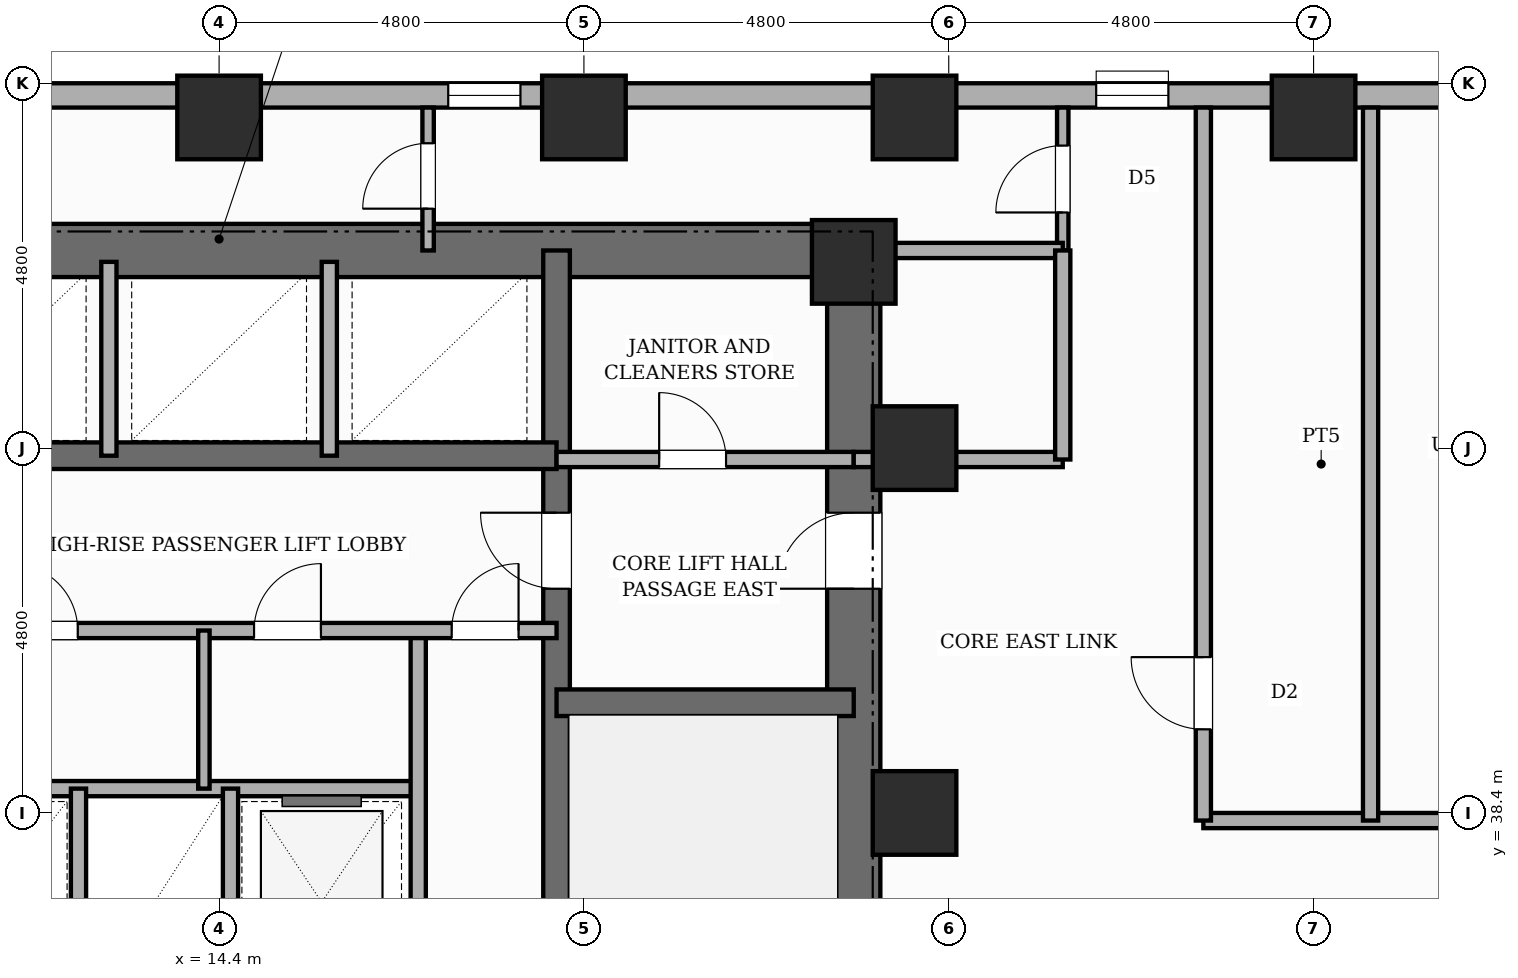
"""IFC4 building model, lengths in metres.
Left out: names, types, materials, properties, quantities, classifications, styles, units other than length and angle.
Written with IfcOpenShell. Run it as: python <this file> out.ifc"""

import sys

from ifc_helpers import new_model, si_unit, direction, frame, frame_2d, origin, origin_2d, place, context, subcontext, project, spatial, rectangle, extrude, element, fill, save


model = new_model("IFC4")
c1 = context("Model", 3, precision=1e-05, world=origin(), true_north=direction((0.0, 1.0)))
c2 = subcontext(c1, "Body", "Model", "MODEL_VIEW")
j1 = project(units=[si_unit("LENGTHUNIT", "METRE"), si_unit("PLANEANGLEUNIT", "RADIAN")], contexts=[c1])
p1 = place(None, origin())
s1 = spatial("IfcSite", under=j1, at=p1, CompositionType="ELEMENT")
p2 = place(p1, origin())
s2 = spatial("IfcBuilding", under=s1, at=p2, CompositionType="ELEMENT")
p3 = place(p2, frame((0.0, 0.0, 68.2)))
s3 = spatial("IfcBuildingStorey", under=s2, at=p3, CompositionType="ELEMENT", Elevation=68.2)
p4 = place(p3, frame((22.75, 30.55, 0.0), z_axis=(0.0, 0.0, 1.0), x_axis=(0.0, 1.0, 0.0)))
e1 = element("IfcWall", 1, at=p4, inside=s3, PredefinedType="SHEAR", context=c2, shape_type="SweptSolid", body=[
    extrude(rectangle(XDim=15.6, YDim=0.7, at=frame_2d((7.8, 0.0))), origin(), (0.0, 0.0, 1.0), 3.6),
])
p5 = place(p4, frame((10.8, 0.0, 0.0)))
e2 = element("IfcOpeningElement", 2, at=p5, cuts=e1, PredefinedType="OPENING", context=c2, shape_type="SweptSolid", body=[
    extrude(rectangle(XDim=1.0, YDim=2.15, at=frame_2d((0.5, 1.075))), frame((0.0, 0.36, 0.0), z_axis=(0.0, -1.0, 0.0), x_axis=(1.0, 0.0, 0.0)), (0.0, 0.0, 1.0), 0.72),
])
p6 = place(p3, frame((6.05, 45.8, 0.0), z_axis=(0.0, 0.0, 1.0), x_axis=(1.0, 0.0, 0.0)))
e3 = element("IfcWall", 3, at=p6, inside=s3, PredefinedType="SHEAR", context=c2, shape_type="SweptSolid", body=[
    extrude(rectangle(XDim=16.7, YDim=0.7, at=frame_2d((8.35, 0.0))), origin(), (0.0, 0.0, 1.0), 3.6),
])
p7 = place(p3, frame((18.84, 30.9, 0.0), z_axis=(0.0, 0.0, 1.0), x_axis=(0.0, 1.0, 0.0)))
e4 = element("IfcWall", 4, at=p7, inside=s3, PredefinedType="SHEAR", context=c2, shape_type="SweptSolid", body=[
    extrude(rectangle(XDim=14.9, YDim=0.35, at=frame_2d((7.45, 0.0))), origin(), (0.0, 0.0, 1.0), 3.6),
])
p8 = place(p7, frame((0.65, 0.0, 0.0)))
e5 = element("IfcOpeningElement", 5, at=p8, cuts=e4, PredefinedType="OPENING", context=c2, shape_type="SweptSolid", body=[
    extrude(rectangle(XDim=0.95, YDim=2.1, at=frame_2d((0.475, 1.05))), frame((0.0, 0.185, 0.0), z_axis=(0.0, -1.0, 0.0), x_axis=(1.0, 0.0, 0.0)), (0.0, 0.0, 1.0), 0.37),
])
p9 = place(p7, frame((10.45, 0.0, 0.0)))
e6 = element("IfcOpeningElement", 6, at=p9, cuts=e4, PredefinedType="OPENING", context=c2, shape_type="SweptSolid", body=[
    extrude(rectangle(XDim=1.0, YDim=2.15, at=frame_2d((0.5, 1.075))), frame((0.0, 0.185, 0.0), z_axis=(0.0, -1.0, 0.0), x_axis=(1.0, 0.0, 0.0)), (0.0, 0.0, 1.0), 0.37),
])
p10 = place(p3, frame((18.84, 39.85, 0.0), z_axis=(0.0, 0.0, 1.0), x_axis=(1.0, 0.0, 0.0)))
e7 = element("IfcWall", 7, at=p10, inside=s3, PredefinedType="SHEAR", context=c2, shape_type="SweptSolid", body=[
    extrude(rectangle(XDim=3.91, YDim=0.35, at=frame_2d((1.955, 0.0))), origin(), (0.0, 0.0, 1.0), 3.6),
])
p11 = place(p3, frame((9.96, 43.1, 0.0), z_axis=(0.0, 0.0, 1.0), x_axis=(1.0, 0.0, 0.0)))
e8 = element("IfcWall", 8, at=p11, inside=s3, PredefinedType="SHEAR", context=c2, shape_type="SweptSolid", body=[
    extrude(rectangle(XDim=8.88, YDim=0.35, at=frame_2d((4.44, 0.0))), origin(), (0.0, 0.0, 1.0), 3.6),
])
for number, where, z_axis, x_axis in (
    (9, (14.4, 47.55, 0.0), (0.0, 0.0, 1.0), (1.0, 0.0, 0.0)),
    (10, (19.2, 47.55, 0.0), (0.0, 0.0, 1.0), (1.0, 0.0, 0.0)),
    (11, (22.75, 45.65, 0.0), (0.0, 0.0, 1.0), (1.0, 0.0, 0.0)),
    (12, (23.55, 38.4, 0.0), (0.0, 0.0, 1.0), (1.0, 0.0, 0.0)),
    (13, (23.55, 43.2, 0.0), (0.0, 0.0, 1.0), (1.0, 0.0, 0.0)),
    (14, (23.55, 47.55, 0.0), (0.0, 0.0, 1.0), (1.0, 0.0, 0.0)),
    (15, (28.8, 47.55, 0.0), (0.0, 0.0, 1.0), (1.0, 0.0, 0.0)),
):
    element("IfcColumn", number, at=place(p3, frame(where, z_axis=z_axis, x_axis=x_axis)), inside=s3, PredefinedType="COLUMN", context=c2, shape_type="SweptSolid", body=[
        extrude(rectangle(XDim=1.1, YDim=1.1, at=origin_2d()), origin(), (0.0, 0.0, 1.0), 3.6),
    ])
p12 = place(p3, frame((7.2, 47.84, 0.0), z_axis=(0.0, 0.0, 1.0), x_axis=(1.0, 0.0, 0.0)))
e16 = element("IfcWall", 16, at=p12, inside=s3, PredefinedType="STANDARD", context=c2, shape_type="SweptSolid", body=[
    extrude(rectangle(XDim=48.0, YDim=0.32, at=frame_2d((24.0, 0.0))), origin(), (0.0, 0.0, 1.0), 2.53),
])
p13 = place(p12, frame((28.803, 0.0, 0.65)))
e17 = element("IfcOpeningElement", 17, at=p13, cuts=e16, PredefinedType="OPENING", context=c2, shape_type="SweptSolid", body=[
    extrude(rectangle(XDim=1.4, YDim=1.1, at=frame_2d((0.7, 0.55))), frame((0.0, 0.17, 0.0), z_axis=(0.0, -1.0, 0.0), x_axis=(1.0, 0.0, 0.0)), (0.0, 0.0, 1.0), 0.34),
])
p14 = place(p12, frame((47.094, 0.0, 0.45)))
e18 = element("IfcOpeningElement", 18, at=p14, cuts=e16, PredefinedType="OPENING", context=c2, shape_type="SweptSolid", body=[
    extrude(rectangle(XDim=0.6, YDim=1.8, at=frame_2d((0.3, 0.9))), frame((0.0, 0.17, 0.0), z_axis=(0.0, -1.0, 0.0), x_axis=(1.0, 0.0, 0.0)), (0.0, 0.0, 1.0), 0.34),
])
p15 = place(p12, frame((18.74, 0.0, 0.45)))
e19 = element("IfcOpeningElement", 19, at=p15, cuts=e16, PredefinedType="OPENING", context=c2, shape_type="SweptSolid", body=[
    extrude(rectangle(XDim=0.95, YDim=1.8, at=frame_2d((0.475, 0.9))), frame((0.0, 0.17, 0.0), z_axis=(0.0, -1.0, 0.0), x_axis=(1.0, 0.0, 0.0)), (0.0, 0.0, 1.0), 0.34),
])
p16 = place(p12, frame((41.65, 0.0, 0.45)))
e20 = element("IfcOpeningElement", 20, at=p16, cuts=e16, PredefinedType="OPENING", context=c2, shape_type="SweptSolid", body=[
    extrude(rectangle(XDim=0.75, YDim=1.8, at=frame_2d((0.375, 0.9))), frame((0.0, 0.17, 0.0), z_axis=(0.0, -1.0, 0.0), x_axis=(1.0, 0.0, 0.0)), (0.0, 0.0, 1.0), 0.34),
])
p17 = place(p12, frame((37.736, 0.0, 0.65)))
e21 = element("IfcOpeningElement", 21, at=p17, cuts=e16, PredefinedType="OPENING", context=c2, shape_type="SweptSolid", body=[
    extrude(rectangle(XDim=1.4, YDim=1.1, at=frame_2d((0.7, 0.55))), frame((0.0, 0.17, 0.0), z_axis=(0.0, -1.0, 0.0), x_axis=(1.0, 0.0, 0.0)), (0.0, 0.0, 1.0), 0.34),
])
p18 = place(p12, frame((0.47, 0.0, 0.45)))
e22 = element("IfcOpeningElement", 22, at=p18, cuts=e16, PredefinedType="OPENING", context=c2, shape_type="SweptSolid", body=[
    extrude(rectangle(XDim=0.95, YDim=1.8, at=frame_2d((0.475, 0.9))), frame((0.0, 0.17, 0.0), z_axis=(0.0, -1.0, 0.0), x_axis=(1.0, 0.0, 0.0)), (0.0, 0.0, 1.0), 0.34),
])
p19 = place(p12, frame((10.215, 0.0, 0.45)))
e23 = element("IfcOpeningElement", 23, at=p19, cuts=e16, PredefinedType="OPENING", context=c2, shape_type="SweptSolid", body=[
    extrude(rectangle(XDim=0.95, YDim=1.8, at=frame_2d((0.475, 0.9))), frame((0.0, 0.17, 0.0), z_axis=(0.0, -1.0, 0.0), x_axis=(1.0, 0.0, 0.0)), (0.0, 0.0, 1.0), 0.34),
])
p20 = place(p12, frame((23.43, 0.0, 0.65)))
e24 = element("IfcOpeningElement", 24, at=p20, cuts=e16, PredefinedType="OPENING", context=c2, shape_type="SweptSolid", body=[
    extrude(rectangle(XDim=1.4, YDim=1.1, at=frame_2d((0.7, 0.55))), frame((0.0, 0.17, 0.0), z_axis=(0.0, -1.0, 0.0), x_axis=(1.0, 0.0, 0.0)), (0.0, 0.0, 1.0), 0.34),
])
p21 = place(p12, frame((42.95, 0.0, 0.65)))
e25 = element("IfcOpeningElement", 25, at=p21, cuts=e16, PredefinedType="OPENING", context=c2, shape_type="SweptSolid", body=[
    extrude(rectangle(XDim=1.4, YDim=1.1, at=frame_2d((0.7, 0.55))), frame((0.0, 0.17, 0.0), z_axis=(0.0, -1.0, 0.0), x_axis=(1.0, 0.0, 0.0)), (0.0, 0.0, 1.0), 0.34),
])
p22 = place(p12, frame((45.984, 0.0, 0.45)))
e26 = element("IfcOpeningElement", 26, at=p22, cuts=e16, PredefinedType="OPENING", context=c2, shape_type="SweptSolid", body=[
    extrude(rectangle(XDim=0.6, YDim=1.8, at=frame_2d((0.3, 0.9))), frame((0.0, 0.17, 0.0), z_axis=(0.0, -1.0, 0.0), x_axis=(1.0, 0.0, 0.0)), (0.0, 0.0, 1.0), 0.34),
])
p23 = place(p3, frame((9.96, 38.72, 0.0), z_axis=(0.0, 0.0, 1.0), x_axis=(1.0, 0.0, 0.0)))
e27 = element("IfcWall", 27, at=p23, inside=s3, PredefinedType="POLYGONAL", context=c2, shape_type="SweptSolid", body=[
    extrude(rectangle(XDim=7.06, YDim=0.2, at=frame_2d((3.53, 0.0))), origin(), (0.0, 0.0, 1.0), 3.35),
])
for number, where, z_axis, x_axis in (
    (28, (12.55, 35.65, 0.0), (0.0, 0.0, 1.0), (0.0, 1.0, 0.0)),
    (29, (14.55, 35.65, 0.0), (0.0, 0.0, 1.0), (0.0, 1.0, 0.0)),
):
    element("IfcWall", number, at=place(p3, frame(where, z_axis=z_axis, x_axis=x_axis)), inside=s3, PredefinedType="POLYGONAL", context=c2, shape_type="SweptSolid", body=[
        extrude(rectangle(XDim=3.07, YDim=0.2, at=frame_2d((1.535, 0.0))), origin(), (0.0, 0.0, 1.0), 3.35),
    ])
p24 = place(p3, frame((17.02, 35.65, 0.0), z_axis=(0.0, 0.0, 1.0), x_axis=(0.0, 1.0, 0.0)))
e30 = element("IfcWall", 30, at=p24, inside=s3, PredefinedType="POLYGONAL", context=c2, shape_type="SweptSolid", body=[
    extrude(rectangle(XDim=5.15, YDim=0.2, at=frame_2d((2.575, 0.0))), origin(), (0.0, 0.0, 1.0), 3.35),
])
p25 = place(p3, frame((9.96, 40.8, 0.0), z_axis=(0.0, 0.0, 1.0), x_axis=(1.0, 0.0, 0.0)))
e31 = element("IfcWall", 31, at=p25, inside=s3, PredefinedType="POLYGONAL", context=c2, shape_type="SweptSolid", body=[
    extrude(rectangle(XDim=8.88, YDim=0.2, at=frame_2d((4.44, 0.0))), origin(), (0.0, 0.0, 1.0), 3.35),
])
p26 = place(p25, frame((7.5, 0.0, 0.0)))
e32 = element("IfcOpeningElement", 32, at=p26, cuts=e31, PredefinedType="OPENING", context=c2, shape_type="SweptSolid", body=[
    extrude(rectangle(XDim=0.88, YDim=2.1, at=frame_2d((0.44, 1.05))), frame((0.0, 0.11, 0.0), z_axis=(0.0, -1.0, 0.0), x_axis=(1.0, 0.0, 0.0)), (0.0, 0.0, 1.0), 0.22),
])
p27 = place(p25, frame((1.7, 0.0, 0.0)))
e33 = element("IfcOpeningElement", 33, at=p27, cuts=e31, PredefinedType="OPENING", context=c2, shape_type="SweptSolid", body=[
    extrude(rectangle(XDim=0.88, YDim=2.1, at=frame_2d((0.44, 1.05))), frame((0.0, 0.11, 0.0), z_axis=(0.0, -1.0, 0.0), x_axis=(1.0, 0.0, 0.0)), (0.0, 0.0, 1.0), 0.22),
])
p28 = place(p25, frame((4.9, 0.0, 0.0)))
e34 = element("IfcOpeningElement", 34, at=p28, cuts=e31, PredefinedType="OPENING", context=c2, shape_type="SweptSolid", body=[
    extrude(rectangle(XDim=0.88, YDim=2.1, at=frame_2d((0.44, 1.05))), frame((0.0, 0.11, 0.0), z_axis=(0.0, -1.0, 0.0), x_axis=(1.0, 0.0, 0.0)), (0.0, 0.0, 1.0), 0.22),
])
p29 = place(p3, frame((18.84, 43.05, 0.0), z_axis=(0.0, 0.0, 1.0), x_axis=(1.0, 0.0, 0.0)))
e35 = element("IfcWall", 35, at=p29, inside=s3, PredefinedType="POLYGONAL", context=c2, shape_type="SweptSolid", body=[
    extrude(rectangle(XDim=3.91, YDim=0.2, at=frame_2d((1.955, 0.0))), origin(), (0.0, 0.0, 1.0), 2.53),
])
p30 = place(p29, frame((1.35, 0.0, 0.0)))
e36 = element("IfcOpeningElement", 36, at=p30, cuts=e35, PredefinedType="OPENING", context=c2, shape_type="SweptSolid", body=[
    extrude(rectangle(XDim=0.88, YDim=2.1, at=frame_2d((0.44, 1.05))), frame((0.0, 0.11, 0.0), z_axis=(0.0, -1.0, 0.0), x_axis=(1.0, 0.0, 0.0)), (0.0, 0.0, 1.0), 0.22),
])
for number, where, z_axis, x_axis in (
    (37, (12.95, 43.1, 0.0), (0.0, 0.0, 1.0), (0.0, 1.0, 0.0)),
    (38, (15.85, 43.1, 0.0), (0.0, 0.0, 1.0), (0.0, 1.0, 0.0)),
):
    element("IfcWall", number, at=place(p3, frame(where, z_axis=z_axis, x_axis=x_axis)), inside=s3, PredefinedType="POLYGONAL", context=c2, shape_type="SweptSolid", body=[
        extrude(rectangle(XDim=2.55, YDim=0.2, at=frame_2d((1.275, 0.0))), origin(), (0.0, 0.0, 1.0), 3.35),
    ])
p31 = place(p3, frame((14.2, 38.72, 0.0), z_axis=(0.0, 0.0, 1.0), x_axis=(0.0, 1.0, 0.0)))
e39 = element("IfcWall", 39, at=p31, inside=s3, PredefinedType="PARTITIONING", context=c2, shape_type="SweptSolid", body=[
    extrude(rectangle(XDim=2.08, YDim=0.15, at=frame_2d((1.04, 0.0))), origin(), (0.0, 0.0, 1.0), 3.35),
])
p32 = place(p3, frame((25.5, 45.8, 0.0), z_axis=(0.0, 0.0, 1.0), x_axis=(0.0, 1.0, 0.0)))
e40 = element("IfcWall", 40, at=p32, inside=s3, PredefinedType="PARTITIONING", context=c2, shape_type="SweptSolid", body=[
    extrude(rectangle(XDim=1.88, YDim=0.15, at=frame_2d((0.94, 0.0))), origin(), (0.0, 0.0, 1.0), 3.35),
])
p33 = place(p32, frame((0.5, 0.0, 0.0)))
e41 = element("IfcOpeningElement", 41, at=p33, cuts=e40, PredefinedType="OPENING", context=c2, shape_type="SweptSolid", body=[
    extrude(rectangle(XDim=0.88, YDim=2.1, at=frame_2d((0.44, 1.05))), frame((0.0, 0.085, 0.0), z_axis=(0.0, -1.0, 0.0), x_axis=(1.0, 0.0, 0.0)), (0.0, 0.0, 1.0), 0.17),
])
p34 = place(p3, frame((22.75, 45.8, 0.0), z_axis=(0.0, 0.0, 1.0), x_axis=(1.0, 0.0, 0.0)))
e42 = element("IfcWall", 42, at=p34, inside=s3, PredefinedType="PARTITIONING", context=c2, shape_type="SweptSolid", body=[
    extrude(rectangle(XDim=2.75, YDim=0.2, at=frame_2d((1.375, 0.0))), origin(), (0.0, 0.0, 1.0), 3.35),
])
p35 = place(p3, frame((17.15, 45.8, 0.0), z_axis=(0.0, 0.0, 1.0), x_axis=(0.0, 1.0, 0.0)))
e43 = element("IfcWall", 43, at=p35, inside=s3, PredefinedType="PARTITIONING", context=c2, shape_type="SweptSolid", body=[
    extrude(rectangle(XDim=1.88, YDim=0.15, at=frame_2d((0.94, 0.0))), origin(), (0.0, 0.0, 1.0), 3.35),
])
p36 = place(p35, frame((0.55, 0.0, 0.0)))
e44 = element("IfcOpeningElement", 44, at=p36, cuts=e43, PredefinedType="OPENING", context=c2, shape_type="SweptSolid", body=[
    extrude(rectangle(XDim=0.86, YDim=2.1, at=frame_2d((0.43, 1.05))), frame((0.0, 0.085, 0.0), z_axis=(0.0, -1.0, 0.0), x_axis=(1.0, 0.0, 0.0)), (0.0, 0.0, 1.0), 0.17),
])
p37 = place(p3, frame((27.35, 38.3, 0.0), z_axis=(0.0, 0.0, 1.0), x_axis=(1.0, 0.0, 0.0)))
e45 = element("IfcWall", 45, at=p37, inside=s3, PredefinedType="PARTITIONING", context=c2, shape_type="SweptSolid", body=[
    extrude(rectangle(XDim=14.43, YDim=0.2, at=frame_2d((7.215, 0.0))), origin(), (0.0, 0.0, 1.0), 3.35),
])
p38 = place(p37, frame((4.803, 0.0, 0.0)))
e46 = element("IfcOpeningElement", 46, at=p38, cuts=e45, PredefinedType="OPENING", context=c2, shape_type="SweptSolid", body=[
    extrude(rectangle(XDim=0.98, YDim=2.18, at=frame_2d((0.49, 1.09))), frame((0.0, 0.11, 0.0), z_axis=(0.0, -1.0, 0.0), x_axis=(1.0, 0.0, 0.0)), (0.0, 0.0, 1.0), 0.22),
])
p39 = place(p3, frame((27.35, 38.3, 0.0), z_axis=(0.0, 0.0, 1.0), x_axis=(0.0, 1.0, 0.0)))
e47 = element("IfcWall", 47, at=p39, inside=s3, PredefinedType="PARTITIONING", context=c2, shape_type="SweptSolid", body=[
    extrude(rectangle(XDim=9.38, YDim=0.2, at=frame_2d((4.69, 0.0))), origin(), (0.0, 0.0, 1.0), 3.35),
])
p40 = place(p39, frame((1.2, 0.0, 0.0)))
e48 = element("IfcOpeningElement", 48, at=p40, cuts=e47, PredefinedType="OPENING", context=c2, shape_type="SweptSolid", body=[
    extrude(rectangle(XDim=0.95, YDim=2.15, at=frame_2d((0.475, 1.075))), frame((0.0, 0.11, 0.0), z_axis=(0.0, -1.0, 0.0), x_axis=(1.0, 0.0, 0.0)), (0.0, 0.0, 1.0), 0.22),
])
p41 = place(p3, frame((22.75, 43.05, 0.0), z_axis=(0.0, 0.0, 1.0), x_axis=(1.0, 0.0, 0.0)))
e49 = element("IfcWall", 49, at=p41, inside=s3, PredefinedType="PARTITIONING", context=c2, shape_type="SweptSolid", body=[
    extrude(rectangle(XDim=2.75, YDim=0.2, at=frame_2d((1.375, 0.0))), origin(), (0.0, 0.0, 1.0), 2.53),
])
p42 = place(p3, frame((25.5, 43.05, 0.0), z_axis=(0.0, 0.0, 1.0), x_axis=(0.0, 1.0, 0.0)))
e50 = element("IfcWall", 50, at=p42, inside=s3, PredefinedType="PARTITIONING", context=c2, shape_type="SweptSolid", body=[
    extrude(rectangle(XDim=2.75, YDim=0.2, at=frame_2d((1.375, 0.0))), origin(), (0.0, 0.0, 1.0), 3.35),
])
p43 = place(p3, frame((29.55, 38.3, 0.0), z_axis=(0.0, 0.0, 1.0), x_axis=(0.0, 1.0, 0.0)))
e51 = element("IfcWall", 51, at=p43, inside=s3, PredefinedType="SOLIDWALL", context=c2, shape_type="SweptSolid", body=[
    extrude(rectangle(XDim=9.38, YDim=0.2, at=frame_2d((4.69, 0.0))), origin(), (0.0, 0.0, 1.0), 3.35),
])
p44 = place(p15, origin())
e52 = element("IfcWindow", 52, at=p44, inside=s3, PartitioningType="SINGLE_PANEL", PredefinedType="WINDOW", context=c2, shape_type="SweptSolid", body=[
    extrude(rectangle(XDim=0.95, YDim=1.8, at=frame_2d((0.475, 0.9))), frame((0.0, 0.03, 0.0), z_axis=(0.0, -1.0, 0.0), x_axis=(1.0, 0.0, 0.0)), (0.0, 0.0, 1.0), 0.06),
])
fill(e19, e52)
p45 = place(p19, origin())
e53 = element("IfcWindow", 53, at=p45, inside=s3, PartitioningType="SINGLE_PANEL", PredefinedType="WINDOW", context=c2, shape_type="SweptSolid", body=[
    extrude(rectangle(XDim=0.95, YDim=1.8, at=frame_2d((0.475, 0.9))), frame((0.0, 0.03, 0.0), z_axis=(0.0, -1.0, 0.0), x_axis=(1.0, 0.0, 0.0)), (0.0, 0.0, 1.0), 0.06),
])
fill(e23, e53)
p46 = place(p26, origin())
e54 = element("IfcDoor", 54, at=p46, inside=s3, OperationType="SINGLE_SWING_RIGHT", PredefinedType="DOOR", context=c2, shape_type="SweptSolid", body=[
    extrude(rectangle(XDim=0.88, YDim=2.1, at=frame_2d((0.44, 1.05))), frame((0.0, 0.025, 0.0), z_axis=(0.0, -1.0, 0.0), x_axis=(1.0, 0.0, 0.0)), (0.0, 0.0, 1.0), 0.05),
])
fill(e32, e54)
p47 = place(p9, origin())
e55 = element("IfcDoor", 55, at=p47, inside=s3, OperationType="SINGLE_SWING_RIGHT", PredefinedType="DOOR", context=c2, shape_type="SweptSolid", body=[
    extrude(rectangle(XDim=1.0, YDim=2.15, at=frame_2d((0.5, 1.075))), frame((0.0, 0.025, 0.0), z_axis=(0.0, -1.0, 0.0), x_axis=(1.0, 0.0, 0.0)), (0.0, 0.0, 1.0), 0.05),
])
fill(e6, e55)
p48 = place(p5, origin())
e56 = element("IfcDoor", 56, at=p48, inside=s3, OperationType="SINGLE_SWING_LEFT", PredefinedType="DOOR", context=c2, shape_type="SweptSolid", body=[
    extrude(rectangle(XDim=1.0, YDim=2.15, at=frame_2d((0.5, 1.075))), frame((0.0, 0.025, 0.0), z_axis=(0.0, -1.0, 0.0), x_axis=(1.0, 0.0, 0.0)), (0.0, 0.0, 1.0), 0.05),
])
fill(e2, e56)
p49 = place(p27, origin())
e57 = element("IfcDoor", 57, at=p49, inside=s3, OperationType="SINGLE_SWING_LEFT", PredefinedType="DOOR", context=c2, shape_type="SweptSolid", body=[
    extrude(rectangle(XDim=0.88, YDim=2.1, at=frame_2d((0.44, 1.05))), frame((0.0, 0.025, 0.0), z_axis=(0.0, -1.0, 0.0), x_axis=(1.0, 0.0, 0.0)), (0.0, 0.0, 1.0), 0.05),
])
fill(e33, e57)
p50 = place(p28, origin())
e58 = element("IfcDoor", 58, at=p50, inside=s3, OperationType="SINGLE_SWING_RIGHT", PredefinedType="DOOR", context=c2, shape_type="SweptSolid", body=[
    extrude(rectangle(XDim=0.88, YDim=2.1, at=frame_2d((0.44, 1.05))), frame((0.0, 0.025, 0.0), z_axis=(0.0, -1.0, 0.0), x_axis=(1.0, 0.0, 0.0)), (0.0, 0.0, 1.0), 0.05),
])
fill(e34, e58)
p51 = place(p30, origin())
e59 = element("IfcDoor", 59, at=p51, inside=s3, OperationType="SINGLE_SWING_LEFT", PredefinedType="DOOR", context=c2, shape_type="SweptSolid", body=[
    extrude(rectangle(XDim=0.88, YDim=2.1, at=frame_2d((0.44, 1.05))), frame((0.0, 0.025, 0.0), z_axis=(0.0, -1.0, 0.0), x_axis=(1.0, 0.0, 0.0)), (0.0, 0.0, 1.0), 0.05),
])
fill(e36, e59)
p52 = place(p33, origin())
e60 = element("IfcDoor", 60, at=p52, inside=s3, OperationType="SINGLE_SWING_LEFT", PredefinedType="DOOR", context=c2, shape_type="SweptSolid", body=[
    extrude(rectangle(XDim=0.88, YDim=2.1, at=frame_2d((0.44, 1.05))), frame((0.0, 0.025, 0.0), z_axis=(0.0, -1.0, 0.0), x_axis=(1.0, 0.0, 0.0)), (0.0, 0.0, 1.0), 0.05),
])
fill(e41, e60)
p53 = place(p36, origin())
e61 = element("IfcDoor", 61, at=p53, inside=s3, OperationType="SINGLE_SWING_LEFT", PredefinedType="DOOR", context=c2, shape_type="SweptSolid", body=[
    extrude(rectangle(XDim=0.86, YDim=2.1, at=frame_2d((0.43, 1.05))), frame((0.0, 0.025, 0.0), z_axis=(0.0, -1.0, 0.0), x_axis=(1.0, 0.0, 0.0)), (0.0, 0.0, 1.0), 0.05),
])
fill(e44, e61)
p54 = place(p40, origin())
e62 = element("IfcDoor", 62, at=p54, inside=s3, OperationType="SINGLE_SWING_RIGHT", PredefinedType="DOOR", context=c2, shape_type="SweptSolid", body=[
    extrude(rectangle(XDim=0.95, YDim=2.15, at=frame_2d((0.475, 1.075))), frame((0.0, 0.025, 0.0), z_axis=(0.0, -1.0, 0.0), x_axis=(1.0, 0.0, 0.0)), (0.0, 0.0, 1.0), 0.05),
])
fill(e48, e62)
save(model, sys.argv[1])
